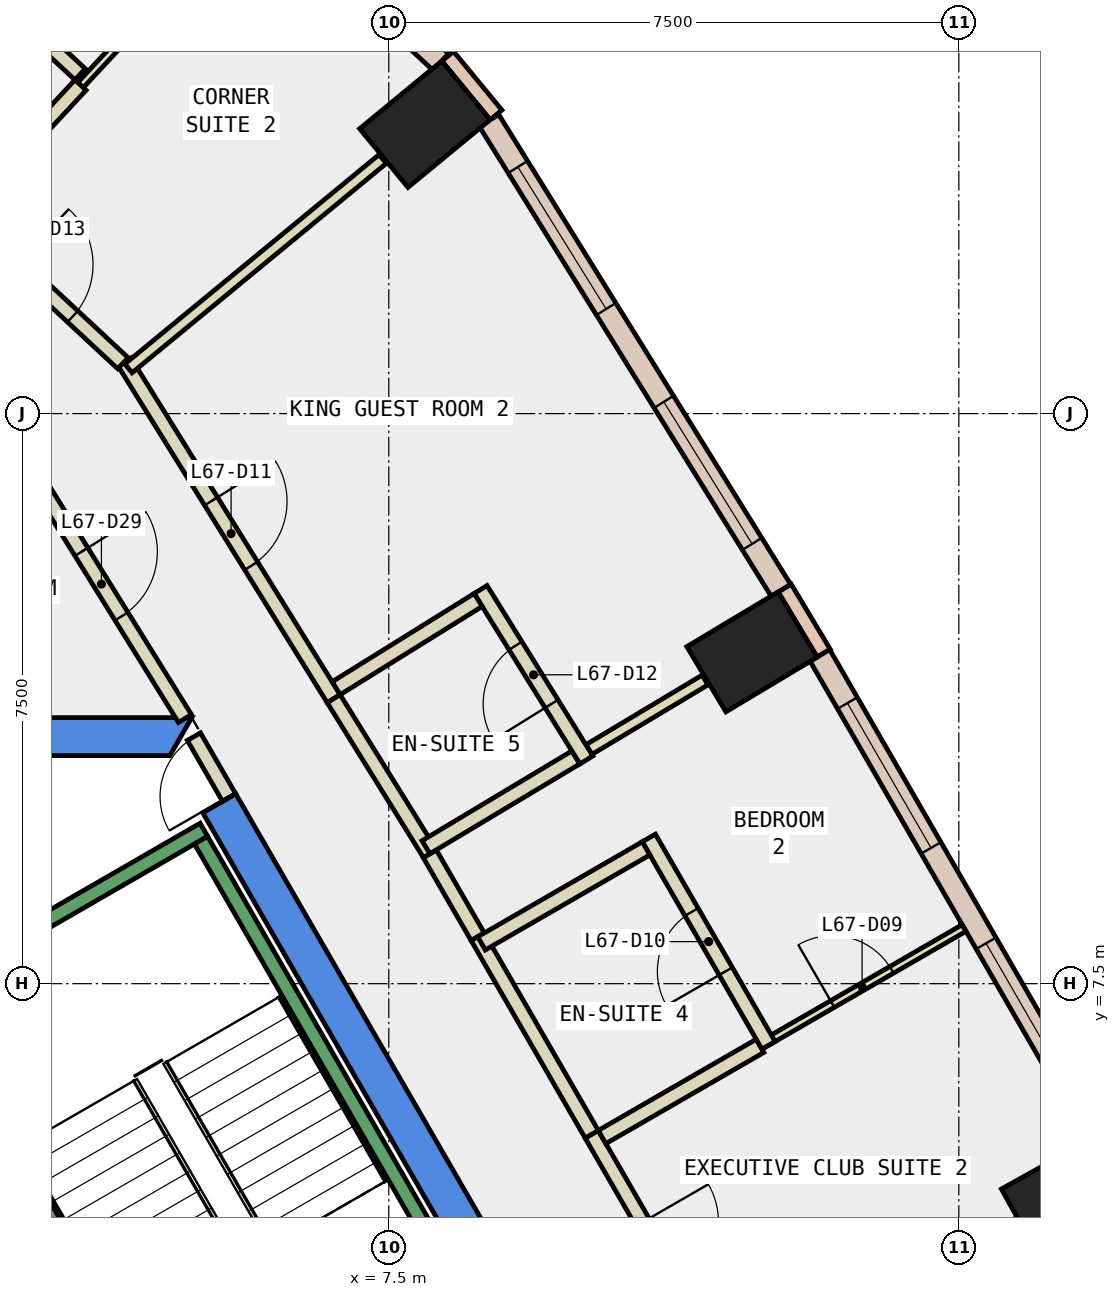
"""IFC4 building model, lengths in metres.
Left out: names, types, materials, properties, quantities, classifications, styles, units other than length and angle.
Written with IfcOpenShell. Run it as: python <this file> out.ifc"""

import sys

from ifc_helpers import new_model, si_unit, direction, frame, frame_2d, origin, origin_2d, place, context, subcontext, project, spatial, polyline, rectangle, outline, extrude, element, fill, save


model = new_model("IFC4")
c1 = context("Model", 3, precision=1e-05, world=origin(), true_north=direction((0.0, 1.0)))
c2 = subcontext(c1, "Body", "Model", "MODEL_VIEW")
j1 = project(units=[si_unit("LENGTHUNIT", "METRE"), si_unit("PLANEANGLEUNIT", "RADIAN")], contexts=[c1])
p1 = place(None, origin())
s1 = spatial("IfcSite", under=j1, at=p1, CompositionType="ELEMENT")
p2 = place(p1, origin())
s2 = spatial("IfcBuilding", under=s1, at=p2, CompositionType="ELEMENT")
p3 = place(p2, frame((0.0, 0.0, 290.0)))
s3 = spatial("IfcBuildingStorey", under=s2, at=p3, CompositionType="ELEMENT", Elevation=290.0)
for number, where, z_axis, x_axis in (
    (1, (16.415, 4.702, -0.34), (0.0, 0.0, 1.0), (-0.486, 0.874, 0.0)),
    (2, (12.279, 11.865, -0.34), (0.0, 0.0, 1.0), (-0.514, 0.858, 0.0)),
    (3, (7.975, 18.807, -0.34), (0.0, 0.0, 1.0), (-0.636, 0.772, 0.0)),
):
    element("IfcColumn", number, at=place(p3, frame(where, z_axis=z_axis, x_axis=x_axis)), inside=s3, PredefinedType="COLUMN", context=c2, shape_type="SweptSolid", body=[
        extrude(rectangle(XDim=1.0, YDim=1.4, at=origin_2d()), origin(), (0.0, 0.0, 1.0), 3.6),
    ])
p4 = place(p3, frame((0.0, 0.0, -0.34)))
e4 = element("IfcWall", 4, at=p4, inside=s3, PredefinedType="SHEAR", context=c2, shape_type="SweptSolid", body=[
    extrude(outline(polyline([(5.486, 9.998), (5.053, 9.748), (9.238, 2.5), (9.815, 2.5), (5.486, 9.998)])), origin(), (0.0, 0.0, 1.0), 3.6),
])
p5 = place(p3, frame((0.0, 0.0, -0.34)))
e5 = element("IfcWall", 5, at=p5, inside=s3, PredefinedType="SHEAR", context=c2, shape_type="SweptSolid", body=[
    extrude(outline(polyline([(4.907, 11.0), (-4.907, 11.0), (-4.619, 10.5), (4.619, 10.5), (4.907, 11.0)])), origin(), (0.0, 0.0, 1.0), 3.6),
])
for number, where, z_axis, x_axis in (
    (6, (13.222, 11.848, 0.0), (0.0, 0.0, 1.0), (-0.514, 0.858, 0.0)),
    (7, (8.911, 18.929, 0.0), (0.0, 0.0, 1.0), (-0.636, 0.772, 0.0)),
):
    element("IfcWall", number, at=place(p3, frame(where, z_axis=z_axis, x_axis=x_axis)), inside=s3, PredefinedType="STANDARD", context=c2, shape_type="SweptSolid", body=[
        extrude(rectangle(XDim=1.0, YDim=0.2, at=frame_2d((0.5, 0.0))), origin(), (0.0, 0.0, 1.0), 3.26),
    ])
p6 = place(p3, frame((16.821, 5.498, 0.0), z_axis=(0.0, 0.0, 1.0), x_axis=(-0.499945412946, 0.866056917341, 0.0)))
e8 = element("IfcWall", 8, at=p6, inside=s3, PredefinedType="STANDARD", context=c2, shape_type="SweptSolid", body=[
    extrude(rectangle(XDim=7.299, YDim=0.3, at=frame_2d((3.649, 0.0))), origin(), (0.0, 0.0, 1.0), 3.26),
])
p7 = place(p6, frame((0.725, 0.0, 0.9)))
e9 = element("IfcOpeningElement", 9, at=p7, cuts=e8, PredefinedType="OPENING", context=c2, shape_type="SweptSolid", body=[
    extrude(rectangle(XDim=2.2, YDim=2.0, at=frame_2d((1.1, 1.0))), frame((0.0, 0.16, 0.0), z_axis=(0.0, -1.0, 0.0), x_axis=(1.0, 0.0, 0.0)), (0.0, 0.0, 1.0), 0.32),
])
p8 = place(p6, frame((4.374, 0.0, 0.9)))
e10 = element("IfcOpeningElement", 10, at=p8, cuts=e8, PredefinedType="OPENING", context=c2, shape_type="SweptSolid", body=[
    extrude(rectangle(XDim=2.2, YDim=2.0, at=frame_2d((1.1, 1.0))), frame((0.0, 0.16, 0.0), z_axis=(0.0, -1.0, 0.0), x_axis=(1.0, 0.0, 0.0)), (0.0, 0.0, 1.0), 0.32),
])
p9 = place(p3, frame((12.659, 12.675, 0.0), z_axis=(0.0, 0.0, 1.0), x_axis=(-0.527762071678, 0.849392250788, 0.0)))
e11 = element("IfcWall", 11, at=p9, inside=s3, PredefinedType="STANDARD", context=c2, shape_type="SweptSolid", body=[
    extrude(rectangle(XDim=7.276, YDim=0.3, at=frame_2d((3.638, 0.0))), origin(), (0.0, 0.0, 1.0), 3.26),
])
p10 = place(p9, frame((0.719, 0.0, 0.9)))
e12 = element("IfcOpeningElement", 12, at=p10, cuts=e11, PredefinedType="OPENING", context=c2, shape_type="SweptSolid", body=[
    extrude(rectangle(XDim=2.2, YDim=2.0, at=frame_2d((1.1, 1.0))), frame((0.0, 0.16, 0.0), z_axis=(0.0, -1.0, 0.0), x_axis=(1.0, 0.0, 0.0)), (0.0, 0.0, 1.0), 0.32),
])
p11 = place(p9, frame((4.357, 0.0, 0.9)))
e13 = element("IfcOpeningElement", 13, at=p11, cuts=e11, PredefinedType="OPENING", context=c2, shape_type="SweptSolid", body=[
    extrude(rectangle(XDim=2.2, YDim=2.0, at=frame_2d((1.1, 1.0))), frame((0.0, 0.16, 0.0), z_axis=(0.0, -1.0, 0.0), x_axis=(1.0, 0.0, 0.0)), (0.0, 0.0, 1.0), 0.32),
])
p12 = place(p3, frame((8.184, 19.626, 0.0), z_axis=(0.0, 0.0, 1.0), x_axis=(-0.732397380344, 0.680877431896, 0.0)))
e14 = element("IfcWall", 14, at=p12, inside=s3, PredefinedType="STANDARD", context=c2, shape_type="SweptSolid", body=[
    extrude(rectangle(XDim=4.019, YDim=0.3, at=frame_2d((2.009, 0.0))), origin(), (0.0, 0.0, 1.0), 3.26),
])
p13 = place(p12, frame((1.309, 0.0, 0.9)))
e15 = element("IfcOpeningElement", 15, at=p13, cuts=e14, PredefinedType="OPENING", context=c2, shape_type="SweptSolid", body=[
    extrude(rectangle(XDim=1.4, YDim=2.0, at=frame_2d((0.7, 1.0))), frame((0.0, 0.16, 0.0), z_axis=(0.0, -1.0, 0.0), x_axis=(1.0, 0.0, 0.0)), (0.0, 0.0, 1.0), 0.32),
])
p14 = place(p3, frame((2.62, 14.526, 0.0), z_axis=(0.0, 0.0, 1.0), x_axis=(0.527726136463, -0.84941457775, 0.0)))
e16 = element("IfcWall", 16, at=p14, inside=s3, PredefinedType="PARTITIONING", context=c2, shape_type="SweptSolid", body=[
    extrude(rectangle(XDim=4.165, YDim=0.2, at=frame_2d((2.083, 0.0))), origin(), (0.0, 0.0, 1.0), 2.4),
])
p15 = place(p14, frame((1.583, 0.0, 0.0)))
e17 = element("IfcOpeningElement", 17, at=p15, cuts=e16, PredefinedType="OPENING", context=c2, shape_type="SweptSolid", body=[
    extrude(rectangle(XDim=1.0, YDim=2.1, at=frame_2d((0.5, 1.05))), frame((0.0, 0.11, 0.0), z_axis=(0.0, -1.0, 0.0), x_axis=(1.0, 0.0, 0.0)), (0.0, 0.0, 1.0), 0.22),
])
p16 = place(p3, frame((10.17, 5.519, 0.0), z_axis=(0.0, 0.0, 1.0), x_axis=(0.499990860175, -0.866030680601, 0.0)))
e18 = element("IfcWall", 18, at=p16, inside=s3, PredefinedType="PARTITIONING", context=c2, shape_type="SweptSolid", body=[
    extrude(rectangle(XDim=3.674, YDim=0.2, at=frame_2d((1.837, 0.0))), origin(), (0.0, 0.0, 1.0), 3.26),
])
p17 = place(p16, frame((1.337, 0.0, 0.0)))
e19 = element("IfcOpeningElement", 19, at=p17, cuts=e18, PredefinedType="OPENING", context=c2, shape_type="SweptSolid", body=[
    extrude(rectangle(XDim=1.0, YDim=2.1, at=frame_2d((0.5, 1.05))), frame((0.0, 0.11, 0.0), z_axis=(0.0, -1.0, 0.0), x_axis=(1.0, 0.0, 0.0)), (0.0, 0.0, 1.0), 0.22),
])
p18 = place(p3, frame((8.039, 9.209, 0.0), z_axis=(0.0, 0.0, 1.0), x_axis=(0.500219543227, -0.865898613334, 0.0)))
e20 = element("IfcWall", 20, at=p18, inside=s3, PredefinedType="PARTITIONING", context=c2, shape_type="SweptSolid", body=[
    extrude(rectangle(XDim=1.261, YDim=0.2, at=frame_2d((0.631, 0.0))), origin(), (0.0, 0.0, 1.0), 3.26),
])
p19 = place(p3, frame((8.67, 8.117, 0.0), z_axis=(0.0, 0.0, 1.0), x_axis=(0.50002537861, -0.866010750942, 0.0)))
e21 = element("IfcWall", 21, at=p19, inside=s3, PredefinedType="PARTITIONING", context=c2, shape_type="SweptSolid", body=[
    extrude(rectangle(XDim=3.0, YDim=0.2, at=frame_2d((1.5, 0.0))), origin(), (0.0, 0.0, 1.0), 3.26),
])
p20 = place(p3, frame((4.022, 15.68, 0.0), z_axis=(0.0, 0.0, 1.0), x_axis=(0.527737948498, -0.849407239029, 0.0)))
e22 = element("IfcWall", 22, at=p20, inside=s3, PredefinedType="PARTITIONING", context=c2, shape_type="SweptSolid", body=[
    extrude(rectangle(XDim=5.217, YDim=0.2, at=frame_2d((2.608, 0.0))), origin(), (0.0, 0.0, 1.0), 3.26),
])
p21 = place(p20, frame((2.159, 0.0, 0.0)))
e23 = element("IfcOpeningElement", 23, at=p21, cuts=e22, PredefinedType="OPENING", context=c2, shape_type="SweptSolid", body=[
    extrude(rectangle(XDim=1.0, YDim=2.1, at=frame_2d((0.5, 1.05))), frame((0.0, 0.11, 0.0), z_axis=(0.0, -1.0, 0.0), x_axis=(1.0, 0.0, 0.0)), (0.0, 0.0, 1.0), 0.22),
])
p22 = place(p3, frame((6.775, 11.249, 0.0), z_axis=(0.0, 0.0, 1.0), x_axis=(0.527803270752, -0.849366650736, 0.0)))
e24 = element("IfcWall", 24, at=p22, inside=s3, PredefinedType="PARTITIONING", context=c2, shape_type="SweptSolid", body=[
    extrude(rectangle(XDim=2.401, YDim=0.2, at=frame_2d((1.2, 0.0))), origin(), (0.0, 0.0, 1.0), 3.26),
])
p23 = place(p3, frame((1.949, 17.572, 0.0), z_axis=(0.0, 0.0, 1.0), x_axis=(0.732331154554, -0.680948661846, 0.0)))
e25 = element("IfcWall", 25, at=p23, inside=s3, PredefinedType="PARTITIONING", context=c2, shape_type="SweptSolid", body=[
    extrude(rectangle(XDim=2.803, YDim=0.2, at=frame_2d((1.402, 0.0))), origin(), (0.0, 0.0, 1.0), 3.26),
])
p24 = place(p23, frame((0.901, 0.0, 0.0)))
e26 = element("IfcOpeningElement", 26, at=p24, cuts=e25, PredefinedType="OPENING", context=c2, shape_type="SweptSolid", body=[
    extrude(rectangle(XDim=1.0, YDim=2.1, at=frame_2d((0.5, 1.05))), frame((0.0, 0.11, 0.0), z_axis=(0.0, -1.0, 0.0), x_axis=(1.0, 0.0, 0.0)), (0.0, 0.0, 1.0), 0.22),
])
p25 = place(p3, frame((12.385, 6.682, 0.0), z_axis=(0.0, 0.0, 1.0), x_axis=(0.865970446821, 0.500095176175, 0.0)))
e27 = element("IfcWall", 27, at=p25, inside=s3, PredefinedType="PARTITIONING", context=c2, shape_type="SweptSolid", body=[
    extrude(rectangle(XDim=3.1, YDim=0.1, at=frame_2d((1.55, 0.0))), origin(), (0.0, 0.0, 1.0), 3.26),
])
p26 = place(p25, frame((1.1, 0.0, 0.0)))
e28 = element("IfcOpeningElement", 28, at=p26, cuts=e27, PredefinedType="OPENING", context=c2, shape_type="SweptSolid", body=[
    extrude(rectangle(XDim=0.9, YDim=2.1, at=frame_2d((0.45, 1.05))), frame((0.0, 0.06, 0.0), z_axis=(0.0, -1.0, 0.0), x_axis=(1.0, 0.0, 0.0)), (0.0, 0.0, 1.0), 0.12),
])
p27 = place(p3, frame((10.306, 5.482, 0.0), z_axis=(0.0, 0.0, 1.0), x_axis=(0.866100915363, 0.499869187296, 0.0)))
e29 = element("IfcWall", 29, at=p27, inside=s3, PredefinedType="PARTITIONING", context=c2, shape_type="SweptSolid", body=[
    extrude(rectangle(XDim=2.401, YDim=0.2, at=frame_2d((1.2, 0.0))), origin(), (0.0, 0.0, 1.0), 3.26),
])
p28 = place(p3, frame((12.496, 6.689, 0.0), z_axis=(0.0, 0.0, 1.0), x_axis=(-0.500039995618, 0.866002311072, 0.0)))
e30 = element("IfcWall", 30, at=p28, inside=s3, PredefinedType="PARTITIONING", context=c2, shape_type="SweptSolid", body=[
    extrude(rectangle(XDim=3.15, YDim=0.2, at=frame_2d((1.575, 0.0))), origin(), (0.0, 0.0, 1.0), 3.26),
])
p29 = place(p28, frame((1.125, 0.0, 0.0)))
e31 = element("IfcOpeningElement", 31, at=p29, cuts=e30, PredefinedType="OPENING", context=c2, shape_type="SweptSolid", body=[
    extrude(rectangle(XDim=0.9, YDim=2.1, at=frame_2d((0.45, 1.05))), frame((0.0, 0.11, 0.0), z_axis=(0.0, -1.0, 0.0), x_axis=(1.0, 0.0, 0.0)), (0.0, 0.0, 1.0), 0.22),
])
p30 = place(p3, frame((10.885, 9.28, 0.0), z_axis=(0.0, 0.0, 1.0), x_axis=(-0.866022959057, -0.500004234368, 0.0)))
e32 = element("IfcWall", 32, at=p30, inside=s3, PredefinedType="PARTITIONING", context=c2, shape_type="SweptSolid", body=[
    extrude(rectangle(XDim=2.5, YDim=0.2, at=frame_2d((1.25, 0.0))), origin(), (0.0, 0.0, 1.0), 3.26),
])
p31 = place(p3, frame((10.133, 10.58, 0.0), z_axis=(0.0, 0.0, 1.0), x_axis=(0.857903919212, 0.513810145287, 0.0)))
e33 = element("IfcWall", 33, at=p31, inside=s3, PredefinedType="PARTITIONING", context=c2, shape_type="SweptSolid", body=[
    extrude(rectangle(XDim=1.781, YDim=0.15, at=frame_2d((0.891, 0.0))), origin(), (0.0, 0.0, 1.0), 3.26),
])
p32 = place(p3, frame((7.989, 9.295, 0.0), z_axis=(0.0, 0.0, 1.0), x_axis=(0.857801856135, 0.513980520654, 0.0)))
e34 = element("IfcWall", 34, at=p32, inside=s3, PredefinedType="PARTITIONING", context=c2, shape_type="SweptSolid", body=[
    extrude(rectangle(XDim=2.3, YDim=0.2, at=frame_2d((1.15, 0.0))), origin(), (0.0, 0.0, 1.0), 3.26),
])
p33 = place(p3, frame((10.1, 10.443, 0.0), z_axis=(0.0, 0.0, 1.0), x_axis=(-0.527510239672, 0.849548672555, 0.0)))
e35 = element("IfcWall", 35, at=p33, inside=s3, PredefinedType="PARTITIONING", context=c2, shape_type="SweptSolid", body=[
    extrude(rectangle(XDim=2.639, YDim=0.2, at=frame_2d((1.319, 0.0))), origin(), (0.0, 0.0, 1.0), 3.26),
])
p34 = place(p33, frame((0.869, 0.0, 0.0)))
e36 = element("IfcOpeningElement", 36, at=p34, cuts=e35, PredefinedType="OPENING", context=c2, shape_type="SweptSolid", body=[
    extrude(rectangle(XDim=0.9, YDim=2.1, at=frame_2d((0.45, 1.05))), frame((0.0, 0.11, 0.0), z_axis=(0.0, -1.0, 0.0), x_axis=(1.0, 0.0, 0.0)), (0.0, 0.0, 1.0), 0.22),
])
p35 = place(p3, frame((8.676, 12.548, 0.0), z_axis=(0.0, 0.0, 1.0), x_axis=(-0.849286670427, -0.527931957202, 0.0)))
e37 = element("IfcWall", 37, at=p35, inside=s3, PredefinedType="PARTITIONING", context=c2, shape_type="SweptSolid", body=[
    extrude(rectangle(XDim=2.199, YDim=0.2, at=frame_2d((1.1, 0.0))), origin(), (0.0, 0.0, 1.0), 3.26),
])
p36 = place(p3, frame((4.075, 15.595, 0.0), z_axis=(0.0, 0.0, 1.0), x_axis=(0.771899326406, 0.635744783616, 0.0)))
e38 = element("IfcWall", 38, at=p36, inside=s3, PredefinedType="PARTITIONING", context=c2, shape_type="SweptSolid", body=[
    extrude(rectangle(XDim=4.332, YDim=0.15, at=frame_2d((2.166, 0.0))), origin(), (0.0, 0.0, 1.0), 3.26),
])
p37 = place(p3, frame((3.444, 19.322, 0.0), z_axis=(0.0, 0.0, 1.0), x_axis=(0.68085394361, 0.732419215662, 0.0)))
e39 = element("IfcWall", 39, at=p37, inside=s3, PredefinedType="PARTITIONING", context=c2, shape_type="SweptSolid", body=[
    extrude(rectangle(XDim=3.3, YDim=0.1, at=frame_2d((1.65, 0.0))), origin(), (0.0, 0.0, 1.0), 3.26),
])
p38 = place(p37, frame((1.2, 0.0, 0.0)))
e40 = element("IfcOpeningElement", 40, at=p38, cuts=e39, PredefinedType="OPENING", context=c2, shape_type="SweptSolid", body=[
    extrude(rectangle(XDim=0.9, YDim=2.1, at=frame_2d((0.45, 1.05))), frame((0.0, 0.06, 0.0), z_axis=(0.0, -1.0, 0.0), x_axis=(1.0, 0.0, 0.0)), (0.0, 0.0, 1.0), 0.12),
])
p39 = place(p3, frame((1.776, 17.528, 0.0), z_axis=(0.0, 0.0, 1.0), x_axis=(0.680978439741, 0.732303464834, 0.0)))
e41 = element("IfcWall", 41, at=p39, inside=s3, PredefinedType="PARTITIONING", context=c2, shape_type="SweptSolid", body=[
    extrude(rectangle(XDim=2.45, YDim=0.2, at=frame_2d((1.225, 0.0))), origin(), (0.0, 0.0, 1.0), 3.26),
])
p40 = place(p3, frame((3.439, 19.464, 0.0), z_axis=(0.0, 0.0, 1.0), x_axis=(-0.732491549411, 0.68077612329, 0.0)))
e42 = element("IfcWall", 42, at=p40, inside=s3, PredefinedType="PARTITIONING", context=c2, shape_type="SweptSolid", body=[
    extrude(rectangle(XDim=1.699, YDim=0.2, at=frame_2d((0.85, 0.0))), origin(), (0.0, 0.0, 1.0), 3.26),
])
p41 = place(p3, frame((5.399, 9.948, 0.0), z_axis=(0.0, 0.0, 1.0), x_axis=(-0.499882215713, 0.866093395895, 0.0)))
e43 = element("IfcWall", 43, at=p41, inside=s3, PredefinedType="PARTITIONING", context=c2, shape_type="SweptSolid", body=[
    extrude(rectangle(XDim=0.926, YDim=0.2, at=frame_2d((0.463, 0.0))), origin(), (0.0, 0.0, 1.0), 2.4),
])
p42 = place(p41, frame((0.017, 0.0, 0.0)))
e44 = element("IfcOpeningElement", 44, at=p42, cuts=e43, PredefinedType="OPENING", context=c2, shape_type="SweptSolid", body=[
    extrude(rectangle(XDim=0.9, YDim=2.1, at=frame_2d((0.45, 1.05))), frame((0.0, 0.11, 0.0), z_axis=(0.0, -1.0, 0.0), x_axis=(1.0, 0.0, 0.0)), (0.0, 0.0, 1.0), 0.22),
])
p43 = place(p3, frame((2.7, 8.158, 0.0), z_axis=(0.0, 0.0, 1.0), x_axis=(0.86611865017, 0.499838457731, 0.0)))
e45 = element("IfcWall", 45, at=p43, inside=s3, PredefinedType="STANDARD", context=c2, shape_type="SweptSolid", body=[
    extrude(rectangle(XDim=2.733, YDim=0.2, at=frame_2d((1.366, 0.0))), origin(), (0.0, 0.0, 1.0), 3.26),
])
p44 = place(p3, frame((4.843, 1.312, 0.0), z_axis=(0.0, 0.0, 1.0), x_axis=(-0.499963383562, 0.866046543262, 0.0)))
e46 = element("IfcWall", 46, at=p44, inside=s3, PredefinedType="STANDARD", context=c2, shape_type="SweptSolid", body=[
    extrude(rectangle(XDim=6.9, YDim=0.2, at=frame_2d((3.45, 0.0))), origin(), (0.0, 0.0, 1.0), 3.26),
])
p45 = place(p44, frame((0.45, 0.0, 0.0)))
e47 = element("IfcOpeningElement", 47, at=p45, cuts=e46, PredefinedType="OPENING", context=c2, shape_type="SweptSolid", body=[
    extrude(rectangle(XDim=1.1, YDim=2.2, at=frame_2d((0.55, 1.1))), frame((0.0, 0.11, 0.0), z_axis=(0.0, -1.0, 0.0), x_axis=(1.0, 0.0, 0.0)), (0.0, 0.0, 1.0), 0.22),
])
p46 = place(p3, frame((8.48, 3.412, 0.0), z_axis=(0.0, 0.0, 1.0), x_axis=(-0.499978703459, 0.866037698999, 0.0)))
e48 = element("IfcWall", 48, at=p46, inside=s3, PredefinedType="STANDARD", context=c2, shape_type="SweptSolid", body=[
    extrude(rectangle(XDim=6.9, YDim=0.2, at=frame_2d((3.45, 0.0))), origin(), (0.0, 0.0, 1.0), 3.26),
])
p47 = place(p7, origin())
e49 = element("IfcWindow", 49, at=p47, inside=s3, PartitioningType="SINGLE_PANEL", PredefinedType="WINDOW", context=c2, shape_type="SweptSolid", body=[
    extrude(rectangle(XDim=2.2, YDim=2.0, at=frame_2d((1.1, 1.0))), frame((0.0, 0.03, 0.0), z_axis=(0.0, -1.0, 0.0), x_axis=(1.0, 0.0, 0.0)), (0.0, 0.0, 1.0), 0.06),
])
fill(e9, e49)
p48 = place(p8, origin())
e50 = element("IfcWindow", 50, at=p48, inside=s3, PartitioningType="SINGLE_PANEL", PredefinedType="WINDOW", context=c2, shape_type="SweptSolid", body=[
    extrude(rectangle(XDim=2.2, YDim=2.0, at=frame_2d((1.1, 1.0))), frame((0.0, 0.03, 0.0), z_axis=(0.0, -1.0, 0.0), x_axis=(1.0, 0.0, 0.0)), (0.0, 0.0, 1.0), 0.06),
])
fill(e10, e50)
p49 = place(p10, origin())
e51 = element("IfcWindow", 51, at=p49, inside=s3, PartitioningType="SINGLE_PANEL", PredefinedType="WINDOW", context=c2, shape_type="SweptSolid", body=[
    extrude(rectangle(XDim=2.2, YDim=2.0, at=frame_2d((1.1, 1.0))), frame((0.0, 0.03, 0.0), z_axis=(0.0, -1.0, 0.0), x_axis=(1.0, 0.0, 0.0)), (0.0, 0.0, 1.0), 0.06),
])
fill(e12, e51)
p50 = place(p11, origin())
e52 = element("IfcWindow", 52, at=p50, inside=s3, PartitioningType="SINGLE_PANEL", PredefinedType="WINDOW", context=c2, shape_type="SweptSolid", body=[
    extrude(rectangle(XDim=2.2, YDim=2.0, at=frame_2d((1.1, 1.0))), frame((0.0, 0.03, 0.0), z_axis=(0.0, -1.0, 0.0), x_axis=(1.0, 0.0, 0.0)), (0.0, 0.0, 1.0), 0.06),
])
fill(e13, e52)
p51 = place(p26, origin())
e53 = element("IfcDoor", 53, at=p51, inside=s3, OperationType="SINGLE_SWING_RIGHT", PredefinedType="DOOR", context=c2, shape_type="SweptSolid", body=[
    extrude(rectangle(XDim=0.9, YDim=2.1, at=frame_2d((0.45, 1.05))), frame((0.0, 0.025, 0.0), z_axis=(0.0, -1.0, 0.0), x_axis=(1.0, 0.0, 0.0)), (0.0, 0.0, 1.0), 0.05),
])
fill(e28, e53)
p52 = place(p29, origin())
e54 = element("IfcDoor", 54, at=p52, inside=s3, OperationType="SINGLE_SWING_RIGHT", PredefinedType="DOOR", context=c2, shape_type="SweptSolid", body=[
    extrude(rectangle(XDim=0.9, YDim=2.1, at=frame_2d((0.45, 1.05))), frame((0.0, 0.025, 0.0), z_axis=(0.0, -1.0, 0.0), x_axis=(1.0, 0.0, 0.0)), (0.0, 0.0, 1.0), 0.05),
])
fill(e31, e54)
p53 = place(p21, origin())
e55 = element("IfcDoor", 55, at=p53, inside=s3, OperationType="SINGLE_SWING_LEFT", PredefinedType="DOOR", context=c2, shape_type="SweptSolid", body=[
    extrude(rectangle(XDim=1.0, YDim=2.1, at=frame_2d((0.5, 1.05))), frame((0.0, 0.025, 0.0), z_axis=(0.0, -1.0, 0.0), x_axis=(1.0, 0.0, 0.0)), (0.0, 0.0, 1.0), 0.05),
])
fill(e23, e55)
p54 = place(p34, origin())
e56 = element("IfcDoor", 56, at=p54, inside=s3, OperationType="SINGLE_SWING_LEFT", PredefinedType="DOOR", context=c2, shape_type="SweptSolid", body=[
    extrude(rectangle(XDim=0.9, YDim=2.1, at=frame_2d((0.45, 1.05))), frame((0.0, 0.025, 0.0), z_axis=(0.0, -1.0, 0.0), x_axis=(1.0, 0.0, 0.0)), (0.0, 0.0, 1.0), 0.05),
])
fill(e36, e56)
p55 = place(p24, origin())
e57 = element("IfcDoor", 57, at=p55, inside=s3, OperationType="SINGLE_SWING_LEFT", PredefinedType="DOOR", context=c2, shape_type="SweptSolid", body=[
    extrude(rectangle(XDim=1.0, YDim=2.1, at=frame_2d((0.5, 1.05))), frame((0.0, 0.025, 0.0), z_axis=(0.0, -1.0, 0.0), x_axis=(1.0, 0.0, 0.0)), (0.0, 0.0, 1.0), 0.05),
])
fill(e26, e57)
p56 = place(p15, origin())
e58 = element("IfcDoor", 58, at=p56, inside=s3, OperationType="SINGLE_SWING_RIGHT", PredefinedType="DOOR", context=c2, shape_type="SweptSolid", body=[
    extrude(rectangle(XDim=1.0, YDim=2.1, at=frame_2d((0.5, 1.05))), frame((0.0, 0.025, 0.0), z_axis=(0.0, -1.0, 0.0), x_axis=(1.0, 0.0, 0.0)), (0.0, 0.0, 1.0), 0.05),
])
fill(e17, e58)
p57 = place(p42, origin())
e59 = element("IfcDoor", 59, at=p57, inside=s3, OperationType="SINGLE_SWING_LEFT", PredefinedType="DOOR", context=c2, shape_type="SweptSolid", body=[
    extrude(rectangle(XDim=0.9, YDim=2.1, at=frame_2d((0.45, 1.05))), frame((0.0, 0.025, 0.0), z_axis=(0.0, -1.0, 0.0), x_axis=(1.0, 0.0, 0.0)), (0.0, 0.0, 1.0), 0.05),
])
fill(e44, e59)
save(model, sys.argv[1])
